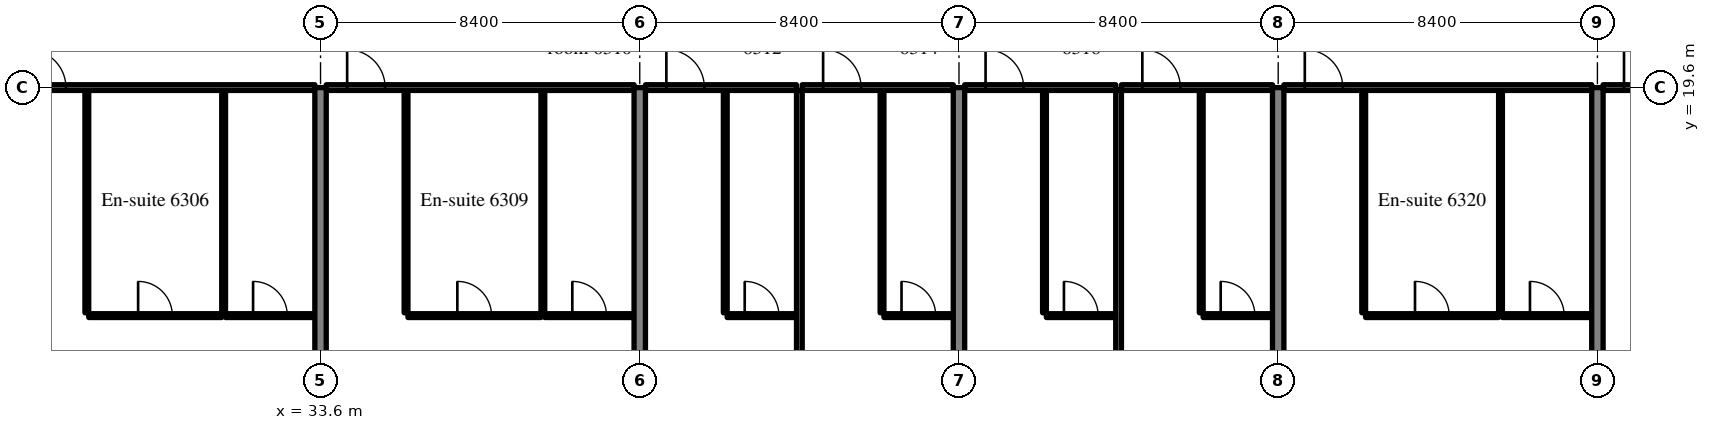
"""IFC4 building model, lengths in metres.
Left out: names, types, materials, properties, quantities, classifications, styles, units other than length and angle.
Written with IfcOpenShell. Run it as: python <this file> out.ifc"""

import sys

from ifc_helpers import new_model, si_unit, direction, frame, frame_2d, origin, place, context, subcontext, project, spatial, rectangle, extrude, source, transform, mapped, element, fill, save


model = new_model("IFC4")
c1 = context("Model", 3, precision=1e-05, world=origin(), true_north=direction((0.0, 1.0)))
c2 = subcontext(c1, "Body", "Model", "MODEL_VIEW")
j1 = project(units=[si_unit("LENGTHUNIT", "METRE"), si_unit("PLANEANGLEUNIT", "RADIAN")], contexts=[c1])
p1 = place(None, origin())
s1 = spatial("IfcSite", under=j1, at=p1, CompositionType="ELEMENT")
p2 = place(p1, origin())
s2 = spatial("IfcBuilding", under=s1, at=p2, CompositionType="ELEMENT")
p3 = place(p2, frame((0.0, 0.0, 260.8)))
s3 = spatial("IfcBuildingStorey", under=s2, at=p3, CompositionType="ELEMENT", Elevation=260.8)
m1 = source(origin(), c2, "Body", "SweptSolid", [
    extrude(rectangle(XDim=14.1, YDim=0.3, at=frame_2d((7.05, 0.0))), origin(), (0.0, 0.0, 1.0), 3.62),
])
for number, where, z_axis, x_axis in (
    (1, (33.6, 5.5, 0.0), (0.0, 0.0, 1.0), (0.0, 1.0, 0.0)),
    (2, (42.0, 5.5, 0.0), (0.0, 0.0, 1.0), (0.0, 1.0, 0.0)),
):
    element("IfcWall", number, at=place(p3, frame(where, z_axis=z_axis, x_axis=x_axis)), inside=s3, PredefinedType="SHEAR", context=c2, shape_type="MappedRepresentation", body=[
        mapped(m1, transform((0.0, 0.0, 0.0), scale=1.0)),
    ])
m2 = source(origin(), c2, "Body", "SweptSolid", [
    extrude(rectangle(XDim=13.1, YDim=0.3, at=frame_2d((6.55, 0.0))), origin(), (0.0, 0.0, 1.0), 3.62),
])
p4 = place(p3, frame((50.4, 6.5, 0.0), z_axis=(0.0, 0.0, 1.0), x_axis=(0.0, 1.0, 0.0)))
e3 = element("IfcWall", 3, at=p4, inside=s3, PredefinedType="SHEAR", context=c2, shape_type="MappedRepresentation", body=[
    mapped(m2, transform((0.0, 0.0, 0.0), scale=1.0)),
])
for number, where, z_axis, x_axis in (
    (4, (58.8, 5.5, 0.0), (0.0, 0.0, 1.0), (0.0, 1.0, 0.0)),
    (5, (67.2, 5.5, 0.0), (0.0, 0.0, 1.0), (0.0, 1.0, 0.0)),
):
    element("IfcWall", number, at=place(p3, frame(where, z_axis=z_axis, x_axis=x_axis)), inside=s3, PredefinedType="SHEAR", context=c2, shape_type="MappedRepresentation", body=[
        mapped(m1, transform((0.0, 0.0, 0.0), scale=1.0)),
    ])
m3 = source(origin(), c2, "Body", "SweptSolid", [
    extrude(rectangle(XDim=5.85, YDim=0.1, at=frame_2d((2.925, 0.0))), origin(), (0.0, 0.0, 1.0), 3.62),
])
for number, where, z_axis, x_axis in (
    (6, (27.45, 13.675, 0.0), (0.0, 0.0, 1.0), (0.0, 1.0, 0.0)),
    (7, (31.05, 13.675, 0.0), (0.0, 0.0, 1.0), (0.0, 1.0, 0.0)),
):
    element("IfcWall", number, at=place(p3, frame(where, z_axis=z_axis, x_axis=x_axis)), inside=s3, PredefinedType="PARTITIONING", context=c2, shape_type="MappedRepresentation", body=[
        mapped(m3, transform((0.0, 0.0, 0.0), scale=1.0)),
    ])
m4 = source(origin(), c2, "Body", "SweptSolid", [
    extrude(rectangle(XDim=3.5, YDim=0.1, at=frame_2d((1.75, 0.0))), origin(), (0.0, 0.0, 1.0), 3.62),
])
p5 = place(p3, frame((27.5, 13.6, 0.0), z_axis=(0.0, 0.0, 1.0), x_axis=(1.0, 0.0, 0.0)))
e8 = element("IfcWall", 8, at=p5, inside=s3, PredefinedType="PARTITIONING", context=c2, shape_type="MappedRepresentation", body=[
    mapped(m4, transform((0.0, 0.0, 0.0), scale=1.0)),
])
m5 = source(origin(), c2, "Body", "SweptSolid", [
    extrude(rectangle(XDim=0.9, YDim=2.1, at=frame_2d((0.45, 1.05))), frame((0.0, 0.06, 0.0), z_axis=(0.0, -1.0, 0.0), x_axis=(1.0, 0.0, 0.0)), (0.0, 0.0, 1.0), 0.12),
])
p6 = place(p5, frame((1.3, 0.0, 0.0)))
e9 = element("IfcOpeningElement", 9, at=p6, cuts=e8, PredefinedType="OPENING", context=c2, shape_type="MappedRepresentation", body=[
    mapped(m5, transform((0.0, 0.0, 0.0), scale=1.0)),
])
m6 = source(origin(), c2, "Body", "SweptSolid", [
    extrude(rectangle(XDim=2.35, YDim=0.1, at=frame_2d((1.175, 0.0))), origin(), (0.0, 0.0, 1.0), 3.62),
])
p7 = place(p3, frame((31.1, 13.6, 0.0), z_axis=(0.0, 0.0, 1.0), x_axis=(1.0, 0.0, 0.0)))
e10 = element("IfcWall", 10, at=p7, inside=s3, PredefinedType="PARTITIONING", context=c2, shape_type="MappedRepresentation", body=[
    mapped(m6, transform((0.0, 0.0, 0.0), scale=1.0)),
])
p8 = place(p7, frame((0.725, 0.0, 0.0)))
e11 = element("IfcOpeningElement", 11, at=p8, cuts=e10, PredefinedType="OPENING", context=c2, shape_type="MappedRepresentation", body=[
    mapped(m5, transform((0.0, 0.0, 0.0), scale=1.0)),
])
m7 = source(origin(), c2, "Body", "SweptSolid", [
    extrude(rectangle(XDim=8.1, YDim=0.15, at=frame_2d((4.05, 0.0))), origin(), (0.0, 0.0, 1.0), 2.92),
])
p9 = place(p3, frame((25.35, 19.6, 0.0), z_axis=(0.0, 0.0, 1.0), x_axis=(1.0, 0.0, 0.0)))
e12 = element("IfcWall", 12, at=p9, inside=s3, PredefinedType="PARTITIONING", context=c2, shape_type="MappedRepresentation", body=[
    mapped(m7, transform((0.0, 0.0, 0.0), scale=1.0)),
])
m8 = source(origin(), c2, "Body", "SweptSolid", [
    extrude(rectangle(XDim=1.0, YDim=2.1, at=frame_2d((0.5, 1.05))), frame((0.0, 0.085, 0.0), z_axis=(0.0, -1.0, 0.0), x_axis=(1.0, 0.0, 0.0)), (0.0, 0.0, 1.0), 0.17),
])
p10 = place(p9, frame((0.55, 0.0, 0.0)))
e13 = element("IfcOpeningElement", 13, at=p10, cuts=e12, PredefinedType="OPENING", context=c2, shape_type="MappedRepresentation", body=[
    mapped(m8, transform((0.0, 0.0, 0.0), scale=1.0)),
])
for number, where, z_axis, x_axis in (
    (14, (35.85, 13.675, 0.0), (0.0, 0.0, 1.0), (0.0, 1.0, 0.0)),
    (15, (39.45, 13.675, 0.0), (0.0, 0.0, 1.0), (0.0, 1.0, 0.0)),
):
    element("IfcWall", number, at=place(p3, frame(where, z_axis=z_axis, x_axis=x_axis)), inside=s3, PredefinedType="PARTITIONING", context=c2, shape_type="MappedRepresentation", body=[
        mapped(m3, transform((0.0, 0.0, 0.0), scale=1.0)),
    ])
p11 = place(p3, frame((35.9, 13.6, 0.0), z_axis=(0.0, 0.0, 1.0), x_axis=(1.0, 0.0, 0.0)))
e16 = element("IfcWall", 16, at=p11, inside=s3, PredefinedType="PARTITIONING", context=c2, shape_type="MappedRepresentation", body=[
    mapped(m4, transform((0.0, 0.0, 0.0), scale=1.0)),
])
p12 = place(p11, frame((1.3, 0.0, 0.0)))
e17 = element("IfcOpeningElement", 17, at=p12, cuts=e16, PredefinedType="OPENING", context=c2, shape_type="MappedRepresentation", body=[
    mapped(m5, transform((0.0, 0.0, 0.0), scale=1.0)),
])
m9 = source(origin(), c2, "Body", "SweptSolid", [
    extrude(rectangle(XDim=2.35, YDim=0.1, at=frame_2d((1.175, 0.0))), origin(), (0.0, 0.0, 1.0), 3.62),
])
p13 = place(p3, frame((39.5, 13.6, 0.0), z_axis=(0.0, 0.0, 1.0), x_axis=(1.0, 0.0, 0.0)))
e18 = element("IfcWall", 18, at=p13, inside=s3, PredefinedType="PARTITIONING", context=c2, shape_type="MappedRepresentation", body=[
    mapped(m9, transform((0.0, 0.0, 0.0), scale=1.0)),
])
p14 = place(p13, frame((0.725, 0.0, 0.0)))
e19 = element("IfcOpeningElement", 19, at=p14, cuts=e18, PredefinedType="OPENING", context=c2, shape_type="MappedRepresentation", body=[
    mapped(m5, transform((0.0, 0.0, 0.0), scale=1.0)),
])
m10 = source(origin(), c2, "Body", "SweptSolid", [
    extrude(rectangle(XDim=8.1, YDim=0.15, at=frame_2d((4.05, 0.0))), origin(), (0.0, 0.0, 1.0), 2.92),
])
p15 = place(p3, frame((33.75, 19.6, 0.0), z_axis=(0.0, 0.0, 1.0), x_axis=(1.0, 0.0, 0.0)))
e20 = element("IfcWall", 20, at=p15, inside=s3, PredefinedType="PARTITIONING", context=c2, shape_type="MappedRepresentation", body=[
    mapped(m10, transform((0.0, 0.0, 0.0), scale=1.0)),
])
p16 = place(p15, frame((0.55, 0.0, 0.0)))
e21 = element("IfcOpeningElement", 21, at=p16, cuts=e20, PredefinedType="OPENING", context=c2, shape_type="MappedRepresentation", body=[
    mapped(m8, transform((0.0, 0.0, 0.0), scale=1.0)),
])
p17 = place(p3, frame((44.25, 13.675, 0.0), z_axis=(0.0, 0.0, 1.0), x_axis=(0.0, 1.0, 0.0)))
e22 = element("IfcWall", 22, at=p17, inside=s3, PredefinedType="PARTITIONING", context=c2, shape_type="MappedRepresentation", body=[
    mapped(m3, transform((0.0, 0.0, 0.0), scale=1.0)),
])
m11 = source(origin(), c2, "Body", "SweptSolid", [
    extrude(rectangle(XDim=1.825, YDim=0.1, at=frame_2d((0.913, 0.0))), origin(), (0.0, 0.0, 1.0), 3.62),
])
p18 = place(p3, frame((44.3, 13.6, 0.0), z_axis=(0.0, 0.0, 1.0), x_axis=(1.0, 0.0, 0.0)))
e23 = element("IfcWall", 23, at=p18, inside=s3, PredefinedType="PARTITIONING", context=c2, shape_type="MappedRepresentation", body=[
    mapped(m11, transform((0.0, 0.0, 0.0), scale=1.0)),
])
p19 = place(p18, frame((0.462, 0.0, 0.0)))
e24 = element("IfcOpeningElement", 24, at=p19, cuts=e23, PredefinedType="OPENING", context=c2, shape_type="MappedRepresentation", body=[
    mapped(m5, transform((0.0, 0.0, 0.0), scale=1.0)),
])
m12 = source(origin(), c2, "Body", "SweptSolid", [
    extrude(rectangle(XDim=3.975, YDim=0.15, at=frame_2d((1.988, 0.0))), origin(), (0.0, 0.0, 1.0), 2.92),
])
p20 = place(p3, frame((42.15, 19.6, 0.0), z_axis=(0.0, 0.0, 1.0), x_axis=(1.0, 0.0, 0.0)))
e25 = element("IfcWall", 25, at=p20, inside=s3, PredefinedType="PARTITIONING", context=c2, shape_type="MappedRepresentation", body=[
    mapped(m12, transform((0.0, 0.0, 0.0), scale=1.0)),
])
p21 = place(p20, frame((0.55, 0.0, 0.0)))
e26 = element("IfcOpeningElement", 26, at=p21, cuts=e25, PredefinedType="OPENING", context=c2, shape_type="MappedRepresentation", body=[
    mapped(m8, transform((0.0, 0.0, 0.0), scale=1.0)),
])
p22 = place(p3, frame((48.375, 13.675, 0.0), z_axis=(0.0, 0.0, 1.0), x_axis=(0.0, 1.0, 0.0)))
e27 = element("IfcWall", 27, at=p22, inside=s3, PredefinedType="PARTITIONING", context=c2, shape_type="MappedRepresentation", body=[
    mapped(m3, transform((0.0, 0.0, 0.0), scale=1.0)),
])
p23 = place(p3, frame((48.425, 13.6, 0.0), z_axis=(0.0, 0.0, 1.0), x_axis=(1.0, 0.0, 0.0)))
e28 = element("IfcWall", 28, at=p23, inside=s3, PredefinedType="PARTITIONING", context=c2, shape_type="MappedRepresentation", body=[
    mapped(m11, transform((0.0, 0.0, 0.0), scale=1.0)),
])
p24 = place(p23, frame((0.463, 0.0, 0.0)))
e29 = element("IfcOpeningElement", 29, at=p24, cuts=e28, PredefinedType="OPENING", context=c2, shape_type="MappedRepresentation", body=[
    mapped(m5, transform((0.0, 0.0, 0.0), scale=1.0)),
])
p25 = place(p3, frame((46.275, 19.6, 0.0), z_axis=(0.0, 0.0, 1.0), x_axis=(1.0, 0.0, 0.0)))
e30 = element("IfcWall", 30, at=p25, inside=s3, PredefinedType="PARTITIONING", context=c2, shape_type="MappedRepresentation", body=[
    mapped(m12, transform((0.0, 0.0, 0.0), scale=1.0)),
])
p26 = place(p25, frame((0.55, 0.0, 0.0)))
e31 = element("IfcOpeningElement", 31, at=p26, cuts=e30, PredefinedType="OPENING", context=c2, shape_type="MappedRepresentation", body=[
    mapped(m8, transform((0.0, 0.0, 0.0), scale=1.0)),
])
m13 = source(origin(), c2, "Body", "SweptSolid", [
    extrude(rectangle(XDim=14.906, YDim=0.15, at=frame_2d((7.453, 0.0))), origin(), (0.0, 0.0, 1.0), 3.62),
])
p27 = place(p3, frame((46.2, 4.619, 0.0), z_axis=(0.0, 0.0, 1.0), x_axis=(0.0, 1.0, 0.0)))
e32 = element("IfcWall", 32, at=p27, inside=s3, PredefinedType="PARTITIONING", context=c2, shape_type="MappedRepresentation", body=[
    mapped(m13, transform((0.0, 0.0, 0.0), scale=1.0)),
])
p28 = place(p3, frame((52.65, 13.675, 0.0), z_axis=(0.0, 0.0, 1.0), x_axis=(0.0, 1.0, 0.0)))
e33 = element("IfcWall", 33, at=p28, inside=s3, PredefinedType="PARTITIONING", context=c2, shape_type="MappedRepresentation", body=[
    mapped(m3, transform((0.0, 0.0, 0.0), scale=1.0)),
])
p29 = place(p3, frame((52.7, 13.6, 0.0), z_axis=(0.0, 0.0, 1.0), x_axis=(1.0, 0.0, 0.0)))
e34 = element("IfcWall", 34, at=p29, inside=s3, PredefinedType="PARTITIONING", context=c2, shape_type="MappedRepresentation", body=[
    mapped(m11, transform((0.0, 0.0, 0.0), scale=1.0)),
])
p30 = place(p29, frame((0.462, 0.0, 0.0)))
e35 = element("IfcOpeningElement", 35, at=p30, cuts=e34, PredefinedType="OPENING", context=c2, shape_type="MappedRepresentation", body=[
    mapped(m5, transform((0.0, 0.0, 0.0), scale=1.0)),
])
m14 = source(origin(), c2, "Body", "SweptSolid", [
    extrude(rectangle(XDim=3.975, YDim=0.15, at=frame_2d((1.987, 0.0))), origin(), (0.0, 0.0, 1.0), 2.92),
])
p31 = place(p3, frame((50.55, 19.6, 0.0), z_axis=(0.0, 0.0, 1.0), x_axis=(1.0, 0.0, 0.0)))
e36 = element("IfcWall", 36, at=p31, inside=s3, PredefinedType="PARTITIONING", context=c2, shape_type="MappedRepresentation", body=[
    mapped(m14, transform((0.0, 0.0, 0.0), scale=1.0)),
])
p32 = place(p31, frame((0.55, 0.0, 0.0)))
e37 = element("IfcOpeningElement", 37, at=p32, cuts=e36, PredefinedType="OPENING", context=c2, shape_type="MappedRepresentation", body=[
    mapped(m8, transform((0.0, 0.0, 0.0), scale=1.0)),
])
p33 = place(p3, frame((56.775, 13.675, 0.0), z_axis=(0.0, 0.0, 1.0), x_axis=(0.0, 1.0, 0.0)))
e38 = element("IfcWall", 38, at=p33, inside=s3, PredefinedType="PARTITIONING", context=c2, shape_type="MappedRepresentation", body=[
    mapped(m3, transform((0.0, 0.0, 0.0), scale=1.0)),
])
p34 = place(p3, frame((56.825, 13.6, 0.0), z_axis=(0.0, 0.0, 1.0), x_axis=(1.0, 0.0, 0.0)))
e39 = element("IfcWall", 39, at=p34, inside=s3, PredefinedType="PARTITIONING", context=c2, shape_type="MappedRepresentation", body=[
    mapped(m11, transform((0.0, 0.0, 0.0), scale=1.0)),
])
p35 = place(p34, frame((0.462, 0.0, 0.0)))
e40 = element("IfcOpeningElement", 40, at=p35, cuts=e39, PredefinedType="OPENING", context=c2, shape_type="MappedRepresentation", body=[
    mapped(m5, transform((0.0, 0.0, 0.0), scale=1.0)),
])
p36 = place(p3, frame((54.675, 19.6, 0.0), z_axis=(0.0, 0.0, 1.0), x_axis=(1.0, 0.0, 0.0)))
e41 = element("IfcWall", 41, at=p36, inside=s3, PredefinedType="PARTITIONING", context=c2, shape_type="MappedRepresentation", body=[
    mapped(m14, transform((0.0, 0.0, 0.0), scale=1.0)),
])
p37 = place(p36, frame((0.55, 0.0, 0.0)))
e42 = element("IfcOpeningElement", 42, at=p37, cuts=e41, PredefinedType="OPENING", context=c2, shape_type="MappedRepresentation", body=[
    mapped(m8, transform((0.0, 0.0, 0.0), scale=1.0)),
])
p38 = place(p3, frame((54.6, 4.619, 0.0), z_axis=(0.0, 0.0, 1.0), x_axis=(0.0, 1.0, 0.0)))
e43 = element("IfcWall", 43, at=p38, inside=s3, PredefinedType="PARTITIONING", context=c2, shape_type="MappedRepresentation", body=[
    mapped(m13, transform((0.0, 0.0, 0.0), scale=1.0)),
])
for number, where, z_axis, x_axis in (
    (44, (61.05, 13.675, 0.0), (0.0, 0.0, 1.0), (0.0, 1.0, 0.0)),
    (45, (64.65, 13.675, 0.0), (0.0, 0.0, 1.0), (0.0, 1.0, 0.0)),
):
    element("IfcWall", number, at=place(p3, frame(where, z_axis=z_axis, x_axis=x_axis)), inside=s3, PredefinedType="PARTITIONING", context=c2, shape_type="MappedRepresentation", body=[
        mapped(m3, transform((0.0, 0.0, 0.0), scale=1.0)),
    ])
p39 = place(p3, frame((61.1, 13.6, 0.0), z_axis=(0.0, 0.0, 1.0), x_axis=(1.0, 0.0, 0.0)))
e46 = element("IfcWall", 46, at=p39, inside=s3, PredefinedType="PARTITIONING", context=c2, shape_type="MappedRepresentation", body=[
    mapped(m4, transform((0.0, 0.0, 0.0), scale=1.0)),
])
p40 = place(p39, frame((1.3, 0.0, 0.0)))
e47 = element("IfcOpeningElement", 47, at=p40, cuts=e46, PredefinedType="OPENING", context=c2, shape_type="MappedRepresentation", body=[
    mapped(m5, transform((0.0, 0.0, 0.0), scale=1.0)),
])
p41 = place(p3, frame((64.7, 13.6, 0.0), z_axis=(0.0, 0.0, 1.0), x_axis=(1.0, 0.0, 0.0)))
e48 = element("IfcWall", 48, at=p41, inside=s3, PredefinedType="PARTITIONING", context=c2, shape_type="MappedRepresentation", body=[
    mapped(m9, transform((0.0, 0.0, 0.0), scale=1.0)),
])
p42 = place(p41, frame((0.725, 0.0, 0.0)))
e49 = element("IfcOpeningElement", 49, at=p42, cuts=e48, PredefinedType="OPENING", context=c2, shape_type="MappedRepresentation", body=[
    mapped(m5, transform((0.0, 0.0, 0.0), scale=1.0)),
])
p43 = place(p3, frame((58.95, 19.6, 0.0), z_axis=(0.0, 0.0, 1.0), x_axis=(1.0, 0.0, 0.0)))
e50 = element("IfcWall", 50, at=p43, inside=s3, PredefinedType="PARTITIONING", context=c2, shape_type="MappedRepresentation", body=[
    mapped(m10, transform((0.0, 0.0, 0.0), scale=1.0)),
])
p44 = place(p43, frame((0.55, 0.0, 0.0)))
e51 = element("IfcOpeningElement", 51, at=p44, cuts=e50, PredefinedType="OPENING", context=c2, shape_type="MappedRepresentation", body=[
    mapped(m8, transform((0.0, 0.0, 0.0), scale=1.0)),
])
p45 = place(p3, frame((67.35, 19.6, 0.0), z_axis=(0.0, 0.0, 1.0), x_axis=(1.0, 0.0, 0.0)))
e52 = element("IfcWall", 52, at=p45, inside=s3, PredefinedType="PARTITIONING", context=c2, shape_type="MappedRepresentation", body=[
    mapped(m7, transform((0.0, 0.0, 0.0), scale=1.0)),
])
p46 = place(p45, frame((0.55, 0.0, 0.0)))
e53 = element("IfcOpeningElement", 53, at=p46, cuts=e52, PredefinedType="OPENING", context=c2, shape_type="MappedRepresentation", body=[
    mapped(m8, transform((0.0, 0.0, 0.0), scale=1.0)),
])
m15 = source(origin(), c2, "Body", "SweptSolid", [
    extrude(rectangle(XDim=0.9, YDim=2.1, at=frame_2d((0.45, 1.05))), frame((0.0, 0.025, 0.0), z_axis=(0.0, -1.0, 0.0), x_axis=(1.0, 0.0, 0.0)), (0.0, 0.0, 1.0), 0.05),
])
p47 = place(p6, origin())
e54 = element("IfcDoor", 54, at=p47, inside=s3, OperationType="SINGLE_SWING_LEFT", PredefinedType="DOOR", context=c2, shape_type="MappedRepresentation", body=[
    mapped(m15, transform((0.0, 0.0, 0.0), scale=1.0)),
])
fill(e9, e54)
p48 = place(p8, origin())
e55 = element("IfcDoor", 55, at=p48, inside=s3, OperationType="SINGLE_SWING_LEFT", PredefinedType="DOOR", context=c2, shape_type="MappedRepresentation", body=[
    mapped(m15, transform((0.0, 0.0, 0.0), scale=1.0)),
])
fill(e11, e55)
m16 = source(origin(), c2, "Body", "SweptSolid", [
    extrude(rectangle(XDim=1.0, YDim=2.1, at=frame_2d((0.5, 1.05))), frame((0.0, 0.025, 0.0), z_axis=(0.0, -1.0, 0.0), x_axis=(1.0, 0.0, 0.0)), (0.0, 0.0, 1.0), 0.05),
])
p49 = place(p10, origin())
e56 = element("IfcDoor", 56, at=p49, inside=s3, OperationType="SINGLE_SWING_LEFT", PredefinedType="DOOR", context=c2, shape_type="MappedRepresentation", body=[
    mapped(m16, transform((0.0, 0.0, 0.0), scale=1.0)),
])
fill(e13, e56)
p50 = place(p12, origin())
e57 = element("IfcDoor", 57, at=p50, inside=s3, OperationType="SINGLE_SWING_LEFT", PredefinedType="DOOR", context=c2, shape_type="MappedRepresentation", body=[
    mapped(m15, transform((0.0, 0.0, 0.0), scale=1.0)),
])
fill(e17, e57)
p51 = place(p14, origin())
e58 = element("IfcDoor", 58, at=p51, inside=s3, OperationType="SINGLE_SWING_LEFT", PredefinedType="DOOR", context=c2, shape_type="MappedRepresentation", body=[
    mapped(m15, transform((0.0, 0.0, 0.0), scale=1.0)),
])
fill(e19, e58)
p52 = place(p16, origin())
e59 = element("IfcDoor", 59, at=p52, inside=s3, OperationType="SINGLE_SWING_LEFT", PredefinedType="DOOR", context=c2, shape_type="MappedRepresentation", body=[
    mapped(m16, transform((0.0, 0.0, 0.0), scale=1.0)),
])
fill(e21, e59)
p53 = place(p19, origin())
e60 = element("IfcDoor", 60, at=p53, inside=s3, OperationType="SINGLE_SWING_LEFT", PredefinedType="DOOR", context=c2, shape_type="MappedRepresentation", body=[
    mapped(m15, transform((0.0, 0.0, 0.0), scale=1.0)),
])
fill(e24, e60)
p54 = place(p21, origin())
e61 = element("IfcDoor", 61, at=p54, inside=s3, OperationType="SINGLE_SWING_LEFT", PredefinedType="DOOR", context=c2, shape_type="MappedRepresentation", body=[
    mapped(m16, transform((0.0, 0.0, 0.0), scale=1.0)),
])
fill(e26, e61)
p55 = place(p24, origin())
e62 = element("IfcDoor", 62, at=p55, inside=s3, OperationType="SINGLE_SWING_LEFT", PredefinedType="DOOR", context=c2, shape_type="MappedRepresentation", body=[
    mapped(m15, transform((0.0, 0.0, 0.0), scale=1.0)),
])
fill(e29, e62)
p56 = place(p26, origin())
e63 = element("IfcDoor", 63, at=p56, inside=s3, OperationType="SINGLE_SWING_LEFT", PredefinedType="DOOR", context=c2, shape_type="MappedRepresentation", body=[
    mapped(m16, transform((0.0, 0.0, 0.0), scale=1.0)),
])
fill(e31, e63)
p57 = place(p30, origin())
e64 = element("IfcDoor", 64, at=p57, inside=s3, OperationType="SINGLE_SWING_LEFT", PredefinedType="DOOR", context=c2, shape_type="MappedRepresentation", body=[
    mapped(m15, transform((0.0, 0.0, 0.0), scale=1.0)),
])
fill(e35, e64)
p58 = place(p32, origin())
e65 = element("IfcDoor", 65, at=p58, inside=s3, OperationType="SINGLE_SWING_LEFT", PredefinedType="DOOR", context=c2, shape_type="MappedRepresentation", body=[
    mapped(m16, transform((0.0, 0.0, 0.0), scale=1.0)),
])
fill(e37, e65)
p59 = place(p35, origin())
e66 = element("IfcDoor", 66, at=p59, inside=s3, OperationType="SINGLE_SWING_LEFT", PredefinedType="DOOR", context=c2, shape_type="MappedRepresentation", body=[
    mapped(m15, transform((0.0, 0.0, 0.0), scale=1.0)),
])
fill(e40, e66)
p60 = place(p37, origin())
e67 = element("IfcDoor", 67, at=p60, inside=s3, OperationType="SINGLE_SWING_LEFT", PredefinedType="DOOR", context=c2, shape_type="MappedRepresentation", body=[
    mapped(m16, transform((0.0, 0.0, 0.0), scale=1.0)),
])
fill(e42, e67)
p61 = place(p40, origin())
e68 = element("IfcDoor", 68, at=p61, inside=s3, OperationType="SINGLE_SWING_LEFT", PredefinedType="DOOR", context=c2, shape_type="MappedRepresentation", body=[
    mapped(m15, transform((0.0, 0.0, 0.0), scale=1.0)),
])
fill(e47, e68)
p62 = place(p42, origin())
e69 = element("IfcDoor", 69, at=p62, inside=s3, OperationType="SINGLE_SWING_LEFT", PredefinedType="DOOR", context=c2, shape_type="MappedRepresentation", body=[
    mapped(m15, transform((0.0, 0.0, 0.0), scale=1.0)),
])
fill(e49, e69)
p63 = place(p44, origin())
e70 = element("IfcDoor", 70, at=p63, inside=s3, OperationType="SINGLE_SWING_LEFT", PredefinedType="DOOR", context=c2, shape_type="MappedRepresentation", body=[
    mapped(m16, transform((0.0, 0.0, 0.0), scale=1.0)),
])
fill(e51, e70)
p64 = place(p46, origin())
e71 = element("IfcDoor", 71, at=p64, inside=s3, OperationType="SINGLE_SWING_LEFT", PredefinedType="DOOR", context=c2, shape_type="MappedRepresentation", body=[
    mapped(m16, transform((0.0, 0.0, 0.0), scale=1.0)),
])
fill(e53, e71)
save(model, sys.argv[1])
